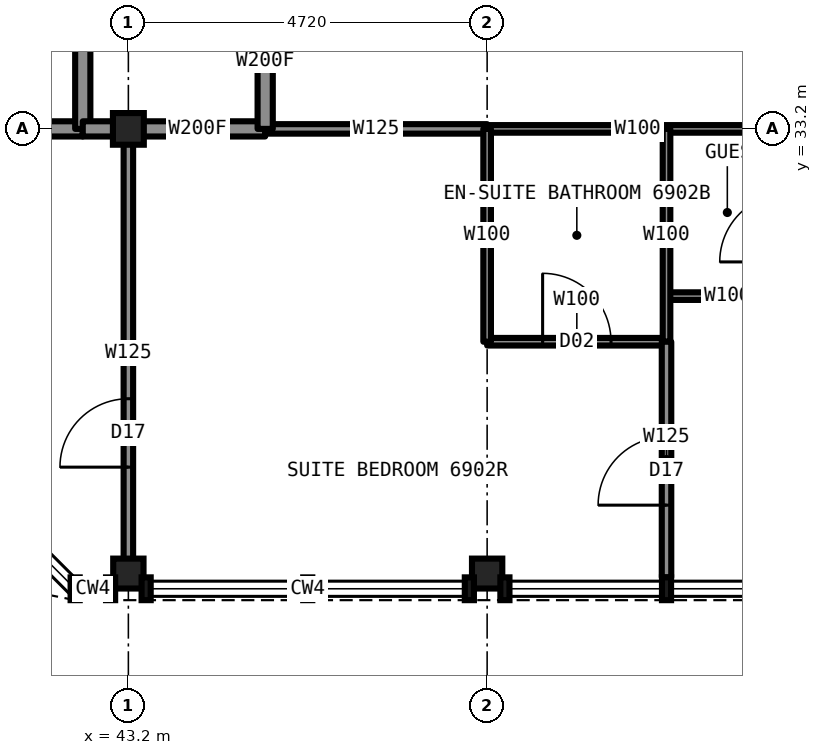
"""IFC4 building model, lengths in metres.
Left out: names, types, materials, properties, quantities, classifications, styles, units other than length and angle.
Written with IfcOpenShell. Run it as: python <this file> out.ifc"""

import sys

from ifc_helpers import new_model, si_unit, direction, frame, frame_2d, origin, origin_2d, place, context, subcontext, project, spatial, rectangle, i_section, extrude, element, fill, save


model = new_model("IFC4")
c1 = context("Model", 3, precision=1e-05, world=origin(), true_north=direction((0.0, 1.0)))
c2 = subcontext(c1, "Body", "Model", "MODEL_VIEW")
j1 = project(units=[si_unit("LENGTHUNIT", "METRE"), si_unit("PLANEANGLEUNIT", "RADIAN")], contexts=[c1])
p1 = place(None, origin())
s1 = spatial("IfcSite", under=j1, at=p1, CompositionType="ELEMENT")
p2 = place(p1, origin())
s2 = spatial("IfcBuilding", under=s1, at=p2, CompositionType="ELEMENT")
p3 = place(p2, frame((0.0, 0.0, 254.7)))
s3 = spatial("IfcBuildingStorey", under=s2, at=p3, CompositionType="ELEMENT", Elevation=254.7)
for number, where, z_axis, x_axis in (
    (1, (43.2, 27.35, 0.0), (0.0, 0.0, 1.0), (1.0, 0.0, 0.0)),
    (2, (47.92, 27.35, 0.0), (0.0, 0.0, 1.0), (1.0, 0.0, 0.0)),
):
    element("IfcColumn", number, at=place(p3, frame(where, z_axis=z_axis, x_axis=x_axis)), inside=s3, PredefinedType="COLUMN", context=c2, shape_type="SweptSolid", body=[
        extrude(i_section(OverallWidth=0.399, OverallDepth=0.394, WebThickness=0.023, FlangeThickness=0.037, at=origin_2d()), origin(), (0.0, 0.0, 1.0), 3.5),
    ])
p4 = place(p3, frame((43.2, 33.2, 0.0), z_axis=(0.0, 0.0, 1.0), x_axis=(1.0, 0.0, 0.0)))
e3 = element("IfcColumn", 3, at=p4, inside=s3, PredefinedType="COLUMN", context=c2, shape_type="SweptSolid", body=[
    extrude(i_section(OverallWidth=0.406, OverallDepth=0.417, WebThickness=0.03, FlangeThickness=0.048, at=origin_2d()), origin(), (0.0, 0.0, 1.0), 3.5),
])
p5 = place(p3, frame((47.92, 33.2, 0.0), z_axis=(0.0, 0.0, 1.0), x_axis=(1.0, 0.0, 0.0)))
e4 = element("IfcWall", 4, at=p5, inside=s3, PredefinedType="PARTITIONING", context=c2, shape_type="SweptSolid", body=[
    extrude(rectangle(XDim=3.96, YDim=0.1, at=frame_2d((1.98, 0.0))), origin(), (0.0, 0.0, 1.0), 3.33),
])
p6 = place(p3, frame((43.22, 33.2, 0.0), z_axis=(0.0, 0.0, 1.0), x_axis=(1.0, 0.0, 0.0)))
e5 = element("IfcWall", 5, at=p6, inside=s3, PredefinedType="PARTITIONING", context=c2, shape_type="SweptSolid", body=[
    extrude(rectangle(XDim=1.78, YDim=0.2, at=frame_2d((0.89, 0.0))), origin(), (0.0, 0.0, 1.0), 3.33),
])
p7 = place(p3, frame((37.3, 33.2, 0.0), z_axis=(0.0, 0.0, 1.0), x_axis=(1.0, 0.0, 0.0)))
e6 = element("IfcWall", 6, at=p7, inside=s3, PredefinedType="PARTITIONING", context=c2, shape_type="SweptSolid", body=[
    extrude(rectangle(XDim=5.3, YDim=0.2, at=frame_2d((2.65, 0.0))), origin(), (0.0, 0.0, 1.0), 2.573),
])
p8 = place(p3, frame((45.0, 33.2, 0.0), z_axis=(0.0, 0.0, 1.0), x_axis=(1.0, 0.0, 0.0)))
e7 = element("IfcWall", 7, at=p8, inside=s3, PredefinedType="PARTITIONING", context=c2, shape_type="SweptSolid", body=[
    extrude(rectangle(XDim=2.92, YDim=0.125, at=frame_2d((1.46, 0.0))), origin(), (0.0, 0.0, 1.0), 3.33),
])
p9 = place(p3, frame((50.28, 31.0, 0.0), z_axis=(0.0, 0.0, 1.0), x_axis=(1.0, 0.0, 0.0)))
e8 = element("IfcWall", 8, at=p9, inside=s3, PredefinedType="PARTITIONING", context=c2, shape_type="SweptSolid", body=[
    extrude(rectangle(XDim=1.6, YDim=0.1, at=frame_2d((0.8, 0.0))), origin(), (0.0, 0.0, 1.0), 3.33),
])
p10 = place(p3, frame((47.92, 30.4, 0.0), z_axis=(0.0, 0.0, 1.0), x_axis=(1.0, 0.0, 0.0)))
e9 = element("IfcWall", 9, at=p10, inside=s3, PredefinedType="PARTITIONING", context=c2, shape_type="SweptSolid", body=[
    extrude(rectangle(XDim=2.36, YDim=0.1, at=frame_2d((1.18, 0.0))), origin(), (0.0, 0.0, 1.0), 3.33),
])
p11 = place(p10, frame((0.73, 0.0, 0.0)))
e10 = element("IfcOpeningElement", 10, at=p11, cuts=e9, PredefinedType="OPENING", context=c2, shape_type="SweptSolid", body=[
    extrude(rectangle(XDim=0.9, YDim=2.1, at=frame_2d((0.45, 1.05))), frame((0.0, 0.06, 0.0), z_axis=(0.0, -1.0, 0.0), x_axis=(1.0, 0.0, 0.0)), (0.0, 0.0, 1.0), 0.12),
])
p12 = place(p3, frame((45.0, 33.2, 0.0), z_axis=(0.0, 0.0, 1.0), x_axis=(0.0, 1.0, 0.0)))
e11 = element("IfcWall", 11, at=p12, inside=s3, PredefinedType="PARTITIONING", context=c2, shape_type="SweptSolid", body=[
    extrude(rectangle(XDim=1.8, YDim=0.2, at=frame_2d((0.9, 0.0))), origin(), (0.0, 0.0, 1.0), 3.33),
])
p13 = place(p3, frame((43.2, 27.3, 0.0), z_axis=(0.0, 0.0, 1.0), x_axis=(0.0, 1.0, 0.0)))
e12 = element("IfcWall", 12, at=p13, inside=s3, PredefinedType="PARTITIONING", context=c2, shape_type="SweptSolid", body=[
    extrude(rectangle(XDim=5.9, YDim=0.125, at=frame_2d((2.95, 0.0))), origin(), (0.0, 0.0, 1.0), 2.573),
])
p14 = place(p13, frame((1.45, 0.0, 0.0)))
e13 = element("IfcOpeningElement", 13, at=p14, cuts=e12, PredefinedType="OPENING", context=c2, shape_type="SweptSolid", body=[
    extrude(rectangle(XDim=0.9, YDim=2.2, at=frame_2d((0.45, 1.1))), frame((0.0, 0.073, 0.0), z_axis=(0.0, -1.0, 0.0), x_axis=(1.0, 0.0, 0.0)), (0.0, 0.0, 1.0), 0.145),
])
p15 = place(p3, frame((42.6, 33.2, 0.0), z_axis=(0.0, 0.0, 1.0), x_axis=(0.0, 1.0, 0.0)))
e14 = element("IfcWall", 14, at=p15, inside=s3, PredefinedType="PARTITIONING", context=c2, shape_type="SweptSolid", body=[
    extrude(rectangle(XDim=23.6, YDim=0.2, at=frame_2d((11.8, 0.0))), origin(), (0.0, 0.0, 1.0), 3.33),
])
p16 = place(p15, frame((8.95, 0.0, 0.0)))
e15 = element("IfcOpeningElement", 15, at=p16, cuts=e14, PredefinedType="OPENING", context=c2, shape_type="SweptSolid", body=[
    extrude(rectangle(XDim=1.1, YDim=2.2, at=frame_2d((0.55, 1.1))), frame((0.0, 0.11, 0.0), z_axis=(0.0, -1.0, 0.0), x_axis=(1.0, 0.0, 0.0)), (0.0, 0.0, 1.0), 0.22),
])
p17 = place(p3, frame((50.28, 30.4, 0.0), z_axis=(0.0, 0.0, 1.0), x_axis=(0.0, 1.0, 0.0)))
e16 = element("IfcWall", 16, at=p17, inside=s3, PredefinedType="PARTITIONING", context=c2, shape_type="SweptSolid", body=[
    extrude(rectangle(XDim=2.8, YDim=0.1, at=frame_2d((1.4, 0.0))), origin(), (0.0, 0.0, 1.0), 3.33),
])
p18 = place(p3, frame((50.28, 27.3, 0.0), z_axis=(0.0, 0.0, 1.0), x_axis=(0.0, 1.0, 0.0)))
e17 = element("IfcWall", 17, at=p18, inside=s3, PredefinedType="PARTITIONING", context=c2, shape_type="SweptSolid", body=[
    extrude(rectangle(XDim=3.1, YDim=0.125, at=frame_2d((1.55, 0.0))), origin(), (0.0, 0.0, 1.0), 3.33),
])
p19 = place(p18, frame((0.95, 0.0, 0.0)))
e18 = element("IfcOpeningElement", 18, at=p19, cuts=e17, PredefinedType="OPENING", context=c2, shape_type="SweptSolid", body=[
    extrude(rectangle(XDim=0.9, YDim=2.2, at=frame_2d((0.45, 1.1))), frame((0.0, 0.073, 0.0), z_axis=(0.0, -1.0, 0.0), x_axis=(1.0, 0.0, 0.0)), (0.0, 0.0, 1.0), 0.145),
])
p20 = place(p3, frame((47.92, 30.4, 0.0), z_axis=(0.0, 0.0, 1.0), x_axis=(0.0, 1.0, 0.0)))
e19 = element("IfcWall", 19, at=p20, inside=s3, PredefinedType="PARTITIONING", context=c2, shape_type="SweptSolid", body=[
    extrude(rectangle(XDim=2.8, YDim=0.1, at=frame_2d((1.4, 0.0))), origin(), (0.0, 0.0, 1.0), 2.573),
])
p21 = place(p3, frame((42.6, 33.2, 0.0), z_axis=(0.0, 0.0, 1.0), x_axis=(1.0, 0.0, 0.0)))
e20 = element("IfcWall", 20, at=p21, inside=s3, PredefinedType="PARTITIONING", context=c2, shape_type="SweptSolid", body=[
    extrude(rectangle(XDim=0.62, YDim=0.2, at=frame_2d((0.31, 0.0))), origin(), (0.0, 0.0, 1.0), 2.573),
])
p22 = place(p11, origin())
e21 = element("IfcDoor", 21, at=p22, inside=s3, OperationType="SINGLE_SWING_RIGHT", PredefinedType="DOOR", context=c2, shape_type="SweptSolid", body=[
    extrude(rectangle(XDim=0.9, YDim=2.1, at=frame_2d((0.45, 1.05))), frame((0.0, 0.025, 0.0), z_axis=(0.0, -1.0, 0.0), x_axis=(1.0, 0.0, 0.0)), (0.0, 0.0, 1.0), 0.05),
])
fill(e10, e21)
p23 = place(p19, origin())
e22 = element("IfcDoor", 22, at=p23, inside=s3, OperationType="SINGLE_SWING_LEFT", PredefinedType="DOOR", context=c2, shape_type="SweptSolid", body=[
    extrude(rectangle(XDim=0.9, YDim=2.2, at=frame_2d((0.45, 1.1))), frame((0.0, 0.025, 0.0), z_axis=(0.0, -1.0, 0.0), x_axis=(1.0, 0.0, 0.0)), (0.0, 0.0, 1.0), 0.05),
])
fill(e18, e22)
p24 = place(p14, origin())
e23 = element("IfcDoor", 23, at=p24, inside=s3, OperationType="SINGLE_SWING_LEFT", PredefinedType="DOOR", context=c2, shape_type="SweptSolid", body=[
    extrude(rectangle(XDim=0.9, YDim=2.2, at=frame_2d((0.45, 1.1))), frame((0.0, 0.025, 0.0), z_axis=(0.0, -1.0, 0.0), x_axis=(1.0, 0.0, 0.0)), (0.0, 0.0, 1.0), 0.05),
])
fill(e13, e23)
save(model, sys.argv[1])
